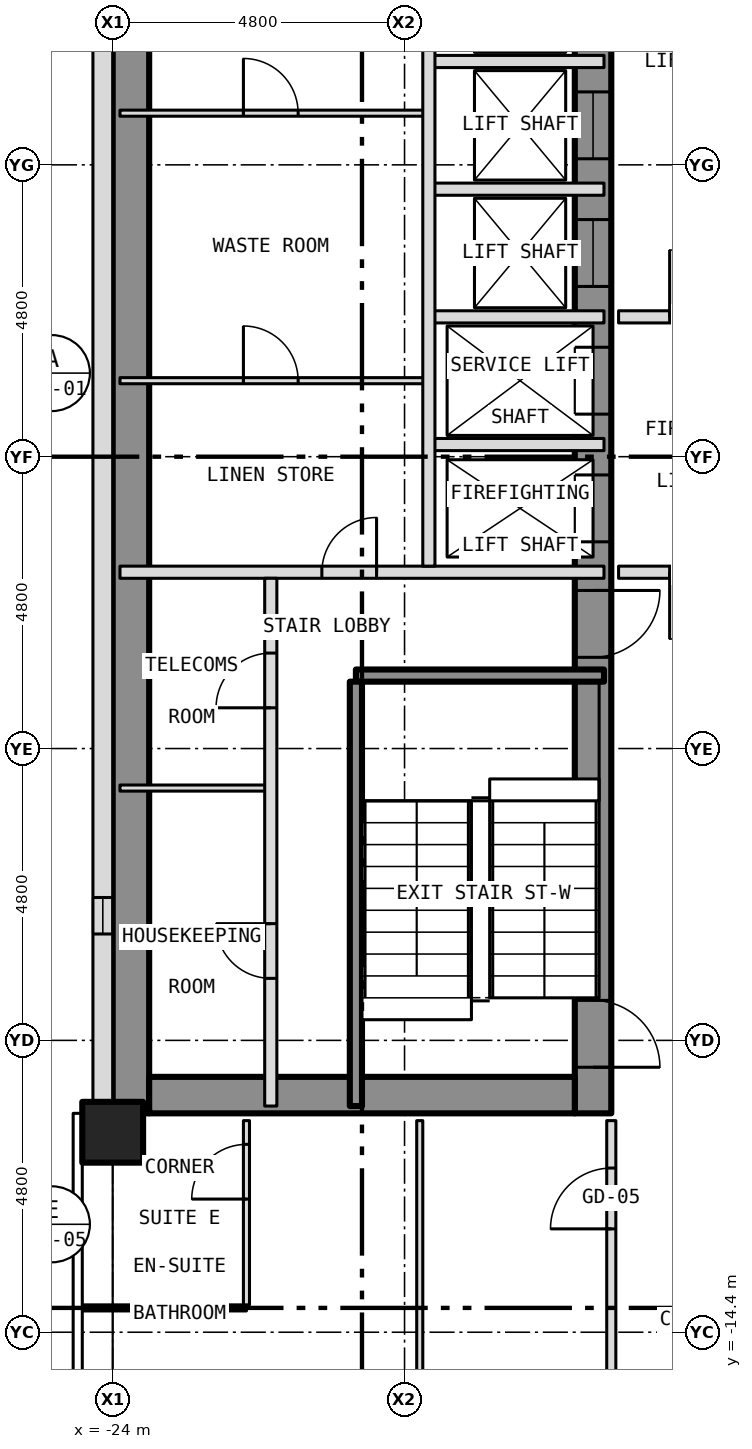
"""IFC4 building model, lengths in metres.
Left out: names, types, materials, properties, quantities, classifications, styles, units other than length and angle.
Written with IfcOpenShell. Run it as: python <this file> out.ifc"""

import sys

from ifc_helpers import new_model, si_unit, direction, frame, frame_2d, origin, origin_2d, place, context, subcontext, project, spatial, rectangle, hollow_rectangle, extrude, element, fill, save


model = new_model("IFC4")
c1 = context("Model", 3, precision=1e-05, world=origin(), true_north=direction((0.0, 1.0)))
c2 = subcontext(c1, "Body", "Model", "MODEL_VIEW")
j1 = project(units=[si_unit("LENGTHUNIT", "METRE"), si_unit("PLANEANGLEUNIT", "RADIAN")], contexts=[c1])
p1 = place(None, origin())
s1 = spatial("IfcSite", under=j1, at=p1, CompositionType="ELEMENT")
p2 = place(p1, origin())
s2 = spatial("IfcBuilding", under=s1, at=p2, CompositionType="ELEMENT")
p3 = place(p2, frame((0.0, 0.0, 63.5)))
s3 = spatial("IfcBuildingStorey", under=s2, at=p3, CompositionType="ELEMENT", Elevation=63.5)
p4 = place(p3, frame((-24.0, -11.111, -0.15), z_axis=(0.0, 0.0, 1.0), x_axis=(1.0, 0.0, 0.0)))
e1 = element("IfcColumn", 1, at=p4, inside=s3, PredefinedType="COLUMN", context=c2, shape_type="SweptSolid", body=[
    extrude(hollow_rectangle(XDim=1.0, YDim=1.0, WallThickness=0.06, at=origin_2d()), origin(), (0.0, 0.0, 1.0), 3.5),
])
p5 = place(p3, frame((-16.1, -10.8, 0.0), z_axis=(0.0, 0.0, 1.0), x_axis=(0.0, 1.0, 0.0)))
e2 = element("IfcWall", 2, at=p5, inside=s3, PredefinedType="SHEAR", context=c2, shape_type="SweptSolid", body=[
    extrude(rectangle(XDim=21.6, YDim=0.6, at=frame_2d((10.8, 0.0))), origin(), (0.0, 0.0, 1.0), 3.25),
])
p6 = place(p5, frame((9.4, 0.0, 0.0)))
e3 = element("IfcOpeningElement", 3, at=p6, cuts=e2, PredefinedType="OPENING", context=c2, shape_type="SweptSolid", body=[
    extrude(rectangle(XDim=1.1, YDim=2.1, at=frame_2d((0.55, 1.05))), frame((0.0, 0.312, 0.0), z_axis=(0.0, -1.0, 0.0), x_axis=(1.0, 0.0, 0.0)), (0.0, 0.0, 1.0), 0.624),
])
p7 = place(p5, frame((11.5, 0.0, 0.0)))
e4 = element("IfcOpeningElement", 4, at=p7, cuts=e2, PredefinedType="OPENING", context=c2, shape_type="SweptSolid", body=[
    extrude(rectangle(XDim=1.1, YDim=2.1, at=frame_2d((0.55, 1.05))), frame((0.0, 0.312, 0.0), z_axis=(0.0, -1.0, 0.0), x_axis=(1.0, 0.0, 0.0)), (0.0, 0.0, 1.0), 0.624),
])
p8 = place(p5, frame((13.6, 0.0, 0.0)))
e5 = element("IfcOpeningElement", 5, at=p8, cuts=e2, PredefinedType="OPENING", context=c2, shape_type="SweptSolid", body=[
    extrude(rectangle(XDim=1.1, YDim=2.1, at=frame_2d((0.55, 1.05))), frame((0.0, 0.312, 0.0), z_axis=(0.0, -1.0, 0.0), x_axis=(1.0, 0.0, 0.0)), (0.0, 0.0, 1.0), 0.624),
])
p9 = place(p5, frame((15.7, 0.0, 0.0)))
e6 = element("IfcOpeningElement", 6, at=p9, cuts=e2, PredefinedType="OPENING", context=c2, shape_type="SweptSolid", body=[
    extrude(rectangle(XDim=1.1, YDim=2.1, at=frame_2d((0.55, 1.05))), frame((0.0, 0.312, 0.0), z_axis=(0.0, -1.0, 0.0), x_axis=(1.0, 0.0, 0.0)), (0.0, 0.0, 1.0), 0.624),
])
p10 = place(p5, frame((17.8, 0.0, 0.0)))
e7 = element("IfcOpeningElement", 7, at=p10, cuts=e2, PredefinedType="OPENING", context=c2, shape_type="SweptSolid", body=[
    extrude(rectangle(XDim=1.1, YDim=2.1, at=frame_2d((0.55, 1.05))), frame((0.0, 0.312, 0.0), z_axis=(0.0, -1.0, 0.0), x_axis=(1.0, 0.0, 0.0)), (0.0, 0.0, 1.0), 0.624),
])
p11 = place(p5, frame((0.758, 0.0, 0.0)))
e8 = element("IfcOpeningElement", 8, at=p11, cuts=e2, PredefinedType="OPENING", context=c2, shape_type="SweptSolid", body=[
    extrude(rectangle(XDim=1.1, YDim=2.1, at=frame_2d((0.55, 1.05))), frame((0.0, 0.312, 0.0), z_axis=(0.0, -1.0, 0.0), x_axis=(1.0, 0.0, 0.0)), (0.0, 0.0, 1.0), 0.624),
])
p12 = place(p5, frame((7.5, 0.0, 0.0)))
e9 = element("IfcOpeningElement", 9, at=p12, cuts=e2, PredefinedType="OPENING", context=c2, shape_type="SweptSolid", body=[
    extrude(rectangle(XDim=1.1, YDim=2.1, at=frame_2d((0.55, 1.05))), frame((0.0, 0.312, 0.0), z_axis=(0.0, -1.0, 0.0), x_axis=(1.0, 0.0, 0.0)), (0.0, 0.0, 1.0), 0.624),
])
p13 = place(p3, frame((-23.7, -10.8, 0.0), z_axis=(0.0, 0.0, 1.0), x_axis=(0.0, 1.0, 0.0)))
e10 = element("IfcWall", 10, at=p13, inside=s3, PredefinedType="SHEAR", context=c2, shape_type="SweptSolid", body=[
    extrude(rectangle(XDim=21.6, YDim=0.6, at=frame_2d((10.8, 0.0))), origin(), (0.0, 0.0, 1.0), 3.25),
])
p14 = place(p3, frame((-23.4, -10.5, 0.0), z_axis=(0.0, 0.0, 1.0), x_axis=(1.0, 0.0, 0.0)))
e11 = element("IfcWall", 11, at=p14, inside=s3, PredefinedType="SHEAR", context=c2, shape_type="SweptSolid", body=[
    extrude(rectangle(XDim=7.0, YDim=0.6, at=frame_2d((3.5, 0.0))), origin(), (0.0, 0.0, 1.0), 3.25),
])
p15 = place(p3, frame((-24.163, 10.8, 0.0), z_axis=(0.0, 0.0, 1.0), x_axis=(0.0, -1.0, 0.0)))
e12 = element("IfcWall", 12, at=p15, inside=s3, PredefinedType="SOLIDWALL", context=c2, shape_type="SweptSolid", body=[
    extrude(rectangle(XDim=21.6, YDim=0.325, at=frame_2d((10.8, 0.0))), origin(), (0.0, 0.0, 1.0), 3.5),
])
p16 = place(p15, frame((18.05, 0.0, 1.0)))
e13 = element("IfcOpeningElement", 13, at=p16, cuts=e12, PredefinedType="OPENING", context=c2, shape_type="SweptSolid", body=[
    extrude(rectangle(XDim=0.6, YDim=1.5, at=frame_2d((0.3, 0.75))), frame((0.0, 0.175, 0.0), z_axis=(0.0, -1.0, 0.0), x_axis=(1.0, 0.0, 0.0)), (0.0, 0.0, 1.0), 0.349),
])
p17 = place(p3, frame((-24.53, -14.0, 0.0), z_axis=(0.0, 0.0, 1.0), x_axis=(1.0, 0.0, 0.0)))
e14 = element("IfcWall", 14, at=p17, inside=s3, PredefinedType="PARTITIONING", context=c2, shape_type="SweptSolid", body=[
    extrude(rectangle(XDim=2.73, YDim=0.1, at=frame_2d((1.365, 0.0))), origin(), (0.0, 0.0, 1.0), 3.35),
])
p18 = place(p3, frame((-23.88, -5.45, 0.0), z_axis=(0.0, 0.0, 1.0), x_axis=(1.0, 0.0, 0.0)))
e15 = element("IfcWall", 15, at=p18, inside=s3, PredefinedType="PARTITIONING", context=c2, shape_type="SweptSolid", body=[
    extrude(rectangle(XDim=2.48, YDim=0.1, at=frame_2d((1.24, 0.0))), origin(), (0.0, 0.0, 1.0), 3.25),
])
p19 = place(p3, frame((-20.0, -3.6, 0.0), z_axis=(0.0, 0.0, 1.0), x_axis=(1.0, 0.0, 0.0)))
e16 = element("IfcWall", 16, at=p19, inside=s3, PredefinedType="SHEAR", context=c2, shape_type="SweptSolid", body=[
    extrude(rectangle(XDim=4.08, YDim=0.2, at=frame_2d((2.04, 0.0))), origin(), (0.0, 0.0, 1.0), 3.25),
])
p20 = place(p3, frame((-23.88, -1.9, 0.0), z_axis=(0.0, 0.0, 1.0), x_axis=(1.0, 0.0, 0.0)))
e17 = element("IfcWall", 17, at=p20, inside=s3, PredefinedType="PARTITIONING", context=c2, shape_type="SweptSolid", body=[
    extrude(rectangle(XDim=7.96, YDim=0.2, at=frame_2d((3.98, 0.0))), origin(), (0.0, 0.0, 1.0), 3.25),
])
p21 = place(p20, frame((3.32, 0.0, 0.0)))
e18 = element("IfcOpeningElement", 18, at=p21, cuts=e17, PredefinedType="OPENING", context=c2, shape_type="SweptSolid", body=[
    extrude(rectangle(XDim=0.9, YDim=2.1, at=frame_2d((0.45, 1.05))), frame((0.0, 0.112, 0.0), z_axis=(0.0, -1.0, 0.0), x_axis=(1.0, 0.0, 0.0)), (0.0, 0.0, 1.0), 0.224),
])
p22 = place(p3, frame((-15.68, -1.9, 0.0), z_axis=(0.0, 0.0, 1.0), x_axis=(1.0, 0.0, 0.0)))
e19 = element("IfcWall", 19, at=p22, inside=s3, PredefinedType="PARTITIONING", context=c2, shape_type="SweptSolid", body=[
    extrude(rectangle(XDim=3.28, YDim=0.2, at=frame_2d((1.64, 0.0))), origin(), (0.0, 0.0, 1.0), 3.35),
])
p23 = place(p22, frame((0.84, 0.0, 0.0)))
e20 = element("IfcOpeningElement", 20, at=p23, cuts=e19, PredefinedType="OPENING", context=c2, shape_type="SweptSolid", body=[
    extrude(rectangle(XDim=1.1, YDim=2.1, at=frame_2d((0.55, 1.05))), frame((0.0, 0.112, 0.0), z_axis=(0.0, -1.0, 0.0), x_axis=(1.0, 0.0, 0.0)), (0.0, 0.0, 1.0), 0.224),
])
p24 = place(p3, frame((-18.8, 0.2, 0.0), z_axis=(0.0, 0.0, 1.0), x_axis=(1.0, 0.0, 0.0)))
e21 = element("IfcWall", 21, at=p24, inside=s3, PredefinedType="PARTITIONING", context=c2, shape_type="SweptSolid", body=[
    extrude(rectangle(XDim=2.88, YDim=0.2, at=frame_2d((1.44, 0.0))), origin(), (0.0, 0.0, 1.0), 3.25),
])
p25 = place(p3, frame((-23.88, 1.25, 0.0), z_axis=(0.0, 0.0, 1.0), x_axis=(1.0, 0.0, 0.0)))
e22 = element("IfcWall", 22, at=p25, inside=s3, PredefinedType="PARTITIONING", context=c2, shape_type="SweptSolid", body=[
    extrude(rectangle(XDim=5.08, YDim=0.1, at=frame_2d((2.54, 0.0))), origin(), (0.0, 0.0, 1.0), 3.25),
])
p26 = place(p25, frame((2.03, 0.0, 0.0)))
e23 = element("IfcOpeningElement", 23, at=p26, cuts=e22, PredefinedType="OPENING", context=c2, shape_type="SweptSolid", body=[
    extrude(rectangle(XDim=0.9, YDim=2.1, at=frame_2d((0.45, 1.05))), frame((0.0, 0.062, 0.0), z_axis=(0.0, -1.0, 0.0), x_axis=(1.0, 0.0, 0.0)), (0.0, 0.0, 1.0), 0.124),
])
p27 = place(p3, frame((-18.8, 2.3, 0.0), z_axis=(0.0, 0.0, 1.0), x_axis=(1.0, 0.0, 0.0)))
e24 = element("IfcWall", 24, at=p27, inside=s3, PredefinedType="PARTITIONING", context=c2, shape_type="SweptSolid", body=[
    extrude(rectangle(XDim=2.88, YDim=0.2, at=frame_2d((1.44, 0.0))), origin(), (0.0, 0.0, 1.0), 3.25),
])
p28 = place(p3, frame((-15.68, 2.3, 0.0), z_axis=(0.0, 0.0, 1.0), x_axis=(1.0, 0.0, 0.0)))
e25 = element("IfcWall", 25, at=p28, inside=s3, PredefinedType="PARTITIONING", context=c2, shape_type="SweptSolid", body=[
    extrude(rectangle(XDim=3.28, YDim=0.2, at=frame_2d((1.64, 0.0))), origin(), (0.0, 0.0, 1.0), 3.35),
])
p29 = place(p28, frame((0.84, 0.0, 0.0)))
e26 = element("IfcOpeningElement", 26, at=p29, cuts=e25, PredefinedType="OPENING", context=c2, shape_type="SweptSolid", body=[
    extrude(rectangle(XDim=1.1, YDim=2.1, at=frame_2d((0.55, 1.05))), frame((0.0, 0.112, 0.0), z_axis=(0.0, -1.0, 0.0), x_axis=(1.0, 0.0, 0.0)), (0.0, 0.0, 1.0), 0.224),
])
p30 = place(p3, frame((-18.8, 4.4, 0.0), z_axis=(0.0, 0.0, 1.0), x_axis=(1.0, 0.0, 0.0)))
e27 = element("IfcWall", 27, at=p30, inside=s3, PredefinedType="PARTITIONING", context=c2, shape_type="SweptSolid", body=[
    extrude(rectangle(XDim=2.88, YDim=0.2, at=frame_2d((1.44, 0.0))), origin(), (0.0, 0.0, 1.0), 3.25),
])
p31 = place(p3, frame((-23.88, 5.65, 0.0), z_axis=(0.0, 0.0, 1.0), x_axis=(1.0, 0.0, 0.0)))
e28 = element("IfcWall", 28, at=p31, inside=s3, PredefinedType="PARTITIONING", context=c2, shape_type="SweptSolid", body=[
    extrude(rectangle(XDim=5.08, YDim=0.1, at=frame_2d((2.54, 0.0))), origin(), (0.0, 0.0, 1.0), 3.25),
])
p32 = place(p31, frame((2.03, 0.0, 0.0)))
e29 = element("IfcOpeningElement", 29, at=p32, cuts=e28, PredefinedType="OPENING", context=c2, shape_type="SweptSolid", body=[
    extrude(rectangle(XDim=0.9, YDim=2.1, at=frame_2d((0.45, 1.05))), frame((0.0, 0.062, 0.0), z_axis=(0.0, -1.0, 0.0), x_axis=(1.0, 0.0, 0.0)), (0.0, 0.0, 1.0), 0.124),
])
p33 = place(p3, frame((-18.8, 6.5, 0.0), z_axis=(0.0, 0.0, 1.0), x_axis=(1.0, 0.0, 0.0)))
e30 = element("IfcWall", 30, at=p33, inside=s3, PredefinedType="PARTITIONING", context=c2, shape_type="SweptSolid", body=[
    extrude(rectangle(XDim=2.88, YDim=0.2, at=frame_2d((1.44, 0.0))), origin(), (0.0, 0.0, 1.0), 3.25),
])
p34 = place(p3, frame((-21.8, -13.95, 0.0), z_axis=(0.0, 0.0, 1.0), x_axis=(0.0, 1.0, 0.0)))
e31 = element("IfcWall", 31, at=p34, inside=s3, PredefinedType="PARTITIONING", context=c2, shape_type="SweptSolid", body=[
    extrude(rectangle(XDim=3.03, YDim=0.1, at=frame_2d((1.515, 0.0))), origin(), (0.0, 0.0, 1.0), 3.35),
])
p35 = place(p34, frame((1.74, 0.0, 0.0)))
e32 = element("IfcOpeningElement", 32, at=p35, cuts=e31, PredefinedType="OPENING", context=c2, shape_type="SweptSolid", body=[
    extrude(rectangle(XDim=0.9, YDim=2.1, at=frame_2d((0.45, 1.05))), frame((0.0, 0.062, 0.0), z_axis=(0.0, -1.0, 0.0), x_axis=(1.0, 0.0, 0.0)), (0.0, 0.0, 1.0), 0.124),
])
p36 = place(p3, frame((-21.4, -10.68, 0.0), z_axis=(0.0, 0.0, 1.0), x_axis=(0.0, 1.0, 0.0)))
e33 = element("IfcWall", 33, at=p36, inside=s3, PredefinedType="PARTITIONING", context=c2, shape_type="SweptSolid", body=[
    extrude(rectangle(XDim=8.68, YDim=0.2, at=frame_2d((4.34, 0.0))), origin(), (0.0, 0.0, 1.0), 3.25),
])
p37 = place(p36, frame((2.1, 0.0, 0.0)))
e34 = element("IfcOpeningElement", 34, at=p37, cuts=e33, PredefinedType="OPENING", context=c2, shape_type="SweptSolid", body=[
    extrude(rectangle(XDim=0.9, YDim=2.1, at=frame_2d((0.45, 1.05))), frame((0.0, 0.112, 0.0), z_axis=(0.0, -1.0, 0.0), x_axis=(1.0, 0.0, 0.0)), (0.0, 0.0, 1.0), 0.224),
])
p38 = place(p36, frame((6.55, 0.0, 0.0)))
e35 = element("IfcOpeningElement", 35, at=p38, cuts=e33, PredefinedType="OPENING", context=c2, shape_type="SweptSolid", body=[
    extrude(rectangle(XDim=0.9, YDim=2.1, at=frame_2d((0.45, 1.05))), frame((0.0, 0.112, 0.0), z_axis=(0.0, -1.0, 0.0), x_axis=(1.0, 0.0, 0.0)), (0.0, 0.0, 1.0), 0.224),
])
p39 = place(p3, frame((-20.0, -10.68, 0.0), z_axis=(0.0, 0.0, 1.0), x_axis=(0.0, 1.0, 0.0)))
e36 = element("IfcWall", 36, at=p39, inside=s3, PredefinedType="SHEAR", context=c2, shape_type="SweptSolid", body=[
    extrude(rectangle(XDim=6.98, YDim=0.2, at=frame_2d((3.49, 0.0))), origin(), (0.0, 0.0, 1.0), 3.25),
])
p40 = place(p3, frame((-18.95, -24.53, 0.0), z_axis=(0.0, 0.0, 1.0), x_axis=(0.0, 1.0, 0.0)))
e37 = element("IfcWall", 37, at=p40, inside=s3, PredefinedType="PARTITIONING", context=c2, shape_type="SweptSolid", body=[
    extrude(rectangle(XDim=13.61, YDim=0.1, at=frame_2d((6.805, 0.0))), origin(), (0.0, 0.0, 1.0), 3.35),
])
p41 = place(p40, frame((6.68, 0.0, 0.0)))
e38 = element("IfcOpeningElement", 38, at=p41, cuts=e37, PredefinedType="OPENING", context=c2, shape_type="SweptSolid", body=[
    extrude(rectangle(XDim=0.9, YDim=2.1, at=frame_2d((0.45, 1.05))), frame((0.0, 0.062, 0.0), z_axis=(0.0, -1.0, 0.0), x_axis=(1.0, 0.0, 0.0)), (0.0, 0.0, 1.0), 0.124),
])
p42 = place(p3, frame((-18.8, -1.8, 0.0), z_axis=(0.0, 0.0, 1.0), x_axis=(0.0, 1.0, 0.0)))
e39 = element("IfcWall", 39, at=p42, inside=s3, PredefinedType="PARTITIONING", context=c2, shape_type="SweptSolid", body=[
    extrude(rectangle(XDim=12.48, YDim=0.2, at=frame_2d((6.24, 0.0))), origin(), (0.0, 0.0, 1.0), 3.25),
])
p43 = place(p3, frame((-15.8, -15.725, 0.0), z_axis=(0.0, 0.0, 1.0), x_axis=(0.0, 1.0, 0.0)))
e40 = element("IfcWall", 40, at=p43, inside=s3, PredefinedType="PARTITIONING", context=c2, shape_type="SweptSolid", body=[
    extrude(rectangle(XDim=4.805, YDim=0.15, at=frame_2d((2.403, 0.0))), origin(), (0.0, 0.0, 1.0), 3.35),
])
p44 = place(p43, frame((3.025, 0.0, 0.0)))
e41 = element("IfcOpeningElement", 41, at=p44, cuts=e40, PredefinedType="OPENING", context=c2, shape_type="SweptSolid", body=[
    extrude(rectangle(XDim=1.0, YDim=2.1, at=frame_2d((0.5, 1.05))), frame((0.0, 0.087, 0.0), z_axis=(0.0, -1.0, 0.0), x_axis=(1.0, 0.0, 0.0)), (0.0, 0.0, 1.0), 0.174),
])
p45 = place(p16, origin())
e42 = element("IfcWindow", 42, at=p45, inside=s3, PartitioningType="SINGLE_PANEL", PredefinedType="WINDOW", context=c2, shape_type="SweptSolid", body=[
    extrude(rectangle(XDim=0.6, YDim=1.5, at=frame_2d((0.3, 0.75))), frame((0.0, -0.073, 0.0), z_axis=(0.0, -1.0, 0.0), x_axis=(1.0, 0.0, 0.0)), (0.0, 0.0, 1.0), 0.06),
])
fill(e13, e42)
p46 = place(p6, origin())
e43 = element("IfcDoor", 43, at=p46, inside=s3, OperationType="SLIDING_TO_LEFT", PredefinedType="DOOR", context=c2, shape_type="SweptSolid", body=[
    extrude(rectangle(XDim=1.1, YDim=2.1, at=frame_2d((0.55, 1.05))), frame((0.0, 0.025, 0.0), z_axis=(0.0, -1.0, 0.0), x_axis=(1.0, 0.0, 0.0)), (0.0, 0.0, 1.0), 0.05),
])
fill(e3, e43)
p47 = place(p7, origin())
e44 = element("IfcDoor", 44, at=p47, inside=s3, OperationType="SLIDING_TO_LEFT", PredefinedType="DOOR", context=c2, shape_type="SweptSolid", body=[
    extrude(rectangle(XDim=1.1, YDim=2.1, at=frame_2d((0.55, 1.05))), frame((0.0, 0.025, 0.0), z_axis=(0.0, -1.0, 0.0), x_axis=(1.0, 0.0, 0.0)), (0.0, 0.0, 1.0), 0.05),
])
fill(e4, e44)
p48 = place(p8, origin())
e45 = element("IfcDoor", 45, at=p48, inside=s3, OperationType="SLIDING_TO_LEFT", PredefinedType="DOOR", context=c2, shape_type="SweptSolid", body=[
    extrude(rectangle(XDim=1.1, YDim=2.1, at=frame_2d((0.55, 1.05))), frame((0.0, 0.025, 0.0), z_axis=(0.0, -1.0, 0.0), x_axis=(1.0, 0.0, 0.0)), (0.0, 0.0, 1.0), 0.05),
])
fill(e5, e45)
p49 = place(p9, origin())
e46 = element("IfcDoor", 46, at=p49, inside=s3, OperationType="SLIDING_TO_LEFT", PredefinedType="DOOR", context=c2, shape_type="SweptSolid", body=[
    extrude(rectangle(XDim=1.1, YDim=2.1, at=frame_2d((0.55, 1.05))), frame((0.0, 0.025, 0.0), z_axis=(0.0, -1.0, 0.0), x_axis=(1.0, 0.0, 0.0)), (0.0, 0.0, 1.0), 0.05),
])
fill(e6, e46)
p50 = place(p11, origin())
e47 = element("IfcDoor", 47, at=p50, inside=s3, OperationType="SINGLE_SWING_LEFT", PredefinedType="DOOR", context=c2, shape_type="SweptSolid", body=[
    extrude(rectangle(XDim=1.1, YDim=2.1, at=frame_2d((0.55, 1.05))), frame((0.0, 0.025, 0.0), z_axis=(0.0, -1.0, 0.0), x_axis=(1.0, 0.0, 0.0)), (0.0, 0.0, 1.0), 0.05),
])
fill(e8, e47)
p51 = place(p12, origin())
e48 = element("IfcDoor", 48, at=p51, inside=s3, OperationType="SINGLE_SWING_RIGHT", PredefinedType="DOOR", context=c2, shape_type="SweptSolid", body=[
    extrude(rectangle(XDim=1.1, YDim=2.1, at=frame_2d((0.55, 1.05))), frame((0.0, 0.025, 0.0), z_axis=(0.0, -1.0, 0.0), x_axis=(1.0, 0.0, 0.0)), (0.0, 0.0, 1.0), 0.05),
])
fill(e9, e48)
p52 = place(p37, origin())
e49 = element("IfcDoor", 49, at=p52, inside=s3, OperationType="SINGLE_SWING_RIGHT", PredefinedType="DOOR", context=c2, shape_type="SweptSolid", body=[
    extrude(rectangle(XDim=0.9, YDim=2.1, at=frame_2d((0.45, 1.05))), frame((0.0, 0.025, 0.0), z_axis=(0.0, -1.0, 0.0), x_axis=(1.0, 0.0, 0.0)), (0.0, 0.0, 1.0), 0.05),
])
fill(e34, e49)
p53 = place(p38, origin())
e50 = element("IfcDoor", 50, at=p53, inside=s3, OperationType="SINGLE_SWING_LEFT", PredefinedType="DOOR", context=c2, shape_type="SweptSolid", body=[
    extrude(rectangle(XDim=0.9, YDim=2.1, at=frame_2d((0.45, 1.05))), frame((0.0, 0.025, 0.0), z_axis=(0.0, -1.0, 0.0), x_axis=(1.0, 0.0, 0.0)), (0.0, 0.0, 1.0), 0.05),
])
fill(e35, e50)
p54 = place(p21, origin())
e51 = element("IfcDoor", 51, at=p54, inside=s3, OperationType="SINGLE_SWING_RIGHT", PredefinedType="DOOR", context=c2, shape_type="SweptSolid", body=[
    extrude(rectangle(XDim=0.9, YDim=2.1, at=frame_2d((0.45, 1.05))), frame((0.0, 0.025, 0.0), z_axis=(0.0, -1.0, 0.0), x_axis=(1.0, 0.0, 0.0)), (0.0, 0.0, 1.0), 0.05),
])
fill(e18, e51)
p55 = place(p26, origin())
e52 = element("IfcDoor", 52, at=p55, inside=s3, OperationType="SINGLE_SWING_LEFT", PredefinedType="DOOR", context=c2, shape_type="SweptSolid", body=[
    extrude(rectangle(XDim=0.9, YDim=2.1, at=frame_2d((0.45, 1.05))), frame((0.0, 0.025, 0.0), z_axis=(0.0, -1.0, 0.0), x_axis=(1.0, 0.0, 0.0)), (0.0, 0.0, 1.0), 0.05),
])
fill(e23, e52)
p56 = place(p32, origin())
e53 = element("IfcDoor", 53, at=p56, inside=s3, OperationType="SINGLE_SWING_LEFT", PredefinedType="DOOR", context=c2, shape_type="SweptSolid", body=[
    extrude(rectangle(XDim=0.9, YDim=2.1, at=frame_2d((0.45, 1.05))), frame((0.0, 0.025, 0.0), z_axis=(0.0, -1.0, 0.0), x_axis=(1.0, 0.0, 0.0)), (0.0, 0.0, 1.0), 0.05),
])
fill(e29, e53)
p57 = place(p23, origin())
e54 = element("IfcDoor", 54, at=p57, inside=s3, OperationType="SINGLE_SWING_LEFT", PredefinedType="DOOR", context=c2, shape_type="SweptSolid", body=[
    extrude(rectangle(XDim=1.1, YDim=2.1, at=frame_2d((0.55, 1.05))), frame((0.0, 0.025, 0.0), z_axis=(0.0, -1.0, 0.0), x_axis=(1.0, 0.0, 0.0)), (0.0, 0.0, 1.0), 0.05),
])
fill(e20, e54)
p58 = place(p29, origin())
e55 = element("IfcDoor", 55, at=p58, inside=s3, OperationType="SINGLE_SWING_LEFT", PredefinedType="DOOR", context=c2, shape_type="SweptSolid", body=[
    extrude(rectangle(XDim=1.1, YDim=2.1, at=frame_2d((0.55, 1.05))), frame((0.0, 0.025, 0.0), z_axis=(0.0, -1.0, 0.0), x_axis=(1.0, 0.0, 0.0)), (0.0, 0.0, 1.0), 0.05),
])
fill(e26, e55)
p59 = place(p44, origin())
e56 = element("IfcDoor", 56, at=p59, inside=s3, OperationType="SINGLE_SWING_LEFT", PredefinedType="DOOR", context=c2, shape_type="SweptSolid", body=[
    extrude(rectangle(XDim=1.0, YDim=2.1, at=frame_2d((0.5, 1.05))), frame((0.0, 0.025, 0.0), z_axis=(0.0, -1.0, 0.0), x_axis=(1.0, 0.0, 0.0)), (0.0, 0.0, 1.0), 0.05),
])
fill(e41, e56)
p60 = place(p35, origin())
e57 = element("IfcDoor", 57, at=p60, inside=s3, OperationType="SINGLE_SWING_LEFT", PredefinedType="DOOR", context=c2, shape_type="SweptSolid", body=[
    extrude(rectangle(XDim=0.9, YDim=2.1, at=frame_2d((0.45, 1.05))), frame((0.0, 0.025, 0.0), z_axis=(0.0, -1.0, 0.0), x_axis=(1.0, 0.0, 0.0)), (0.0, 0.0, 1.0), 0.05),
])
fill(e32, e57)
save(model, sys.argv[1])
